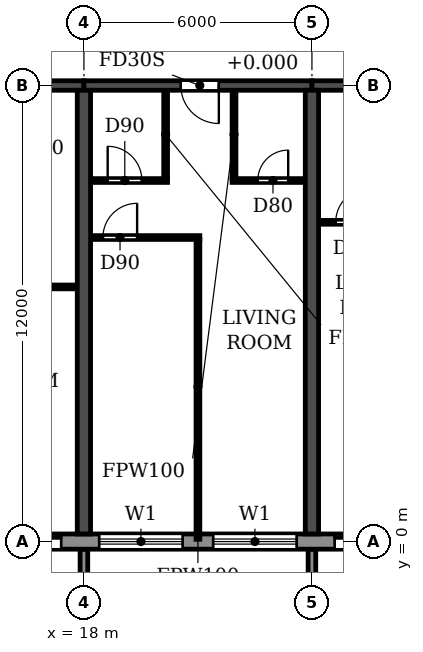
"""IFC4 building model, lengths in metres.
Left out: names, types, materials, properties, quantities, classifications, styles, units other than length and angle.
Written with IfcOpenShell. Run it as: python <this file> out.ifc"""

import sys

from ifc_helpers import new_model, si_unit, direction, frame, frame_2d, origin, place, context, subcontext, project, spatial, polyline, rectangle, outline, extrude, source, transform, mapped, element, fill, save


model = new_model("IFC4")
c1 = context("Model", 3, precision=1e-05, world=origin(), true_north=direction((0.0, 1.0)))
c2 = subcontext(c1, "Body", "Model", "MODEL_VIEW")
j1 = project(units=[si_unit("LENGTHUNIT", "METRE"), si_unit("PLANEANGLEUNIT", "RADIAN")], contexts=[c1])
p1 = place(None, origin())
s1 = spatial("IfcSite", under=j1, at=p1, CompositionType="ELEMENT")
p2 = place(p1, origin())
s2 = spatial("IfcBuilding", under=s1, at=p2, CompositionType="ELEMENT")
p3 = place(p2, frame((0.0, 0.0, 82.8)))
s3 = spatial("IfcBuildingStorey", under=s2, at=p3, CompositionType="ELEMENT", Elevation=82.8)
for number, where, z_axis, x_axis in (
    (1, (18.0, 0.2, 0.0), (0.0, 0.0, 1.0), (0.0, 1.0, 0.0)),
    (2, (24.0, 0.2, 0.0), (0.0, 0.0, 1.0), (0.0, 1.0, 0.0)),
):
    element("IfcWall", number, at=place(p3, frame(where, z_axis=z_axis, x_axis=x_axis)), inside=s3, PredefinedType="SHEAR", context=c2, shape_type="SweptSolid", body=[
        extrude(rectangle(XDim=11.675, YDim=0.35, at=frame_2d((5.837, 0.0))), origin(), (0.0, 0.0, 1.0), 3.06),
    ])
p4 = place(p3, frame((12.0, 12.0, 0.0), z_axis=(0.0, 0.0, 1.0), x_axis=(1.0, 0.0, 0.0)))
e3 = element("IfcWall", 3, at=p4, inside=s3, PredefinedType="SHEAR", context=c2, shape_type="SweptSolid", body=[
    extrude(rectangle(XDim=6.0, YDim=0.25, at=frame_2d((3.0, 0.0))), origin(), (0.0, 0.0, 1.0), 2.46),
])
p5 = place(p4, frame((2.55, 0.0, 0.0)))
e4 = element("IfcOpeningElement", 4, at=p5, cuts=e3, PredefinedType="OPENING", context=c2, shape_type="SweptSolid", body=[
    extrude(rectangle(XDim=1.0, YDim=2.1, at=frame_2d((0.5, 1.05))), frame((0.0, 0.135, 0.0), z_axis=(0.0, -1.0, 0.0), x_axis=(1.0, 0.0, 0.0)), (0.0, 0.0, 1.0), 0.27),
])
p6 = place(p3, frame((18.0, 12.0, 0.0), z_axis=(0.0, 0.0, 1.0), x_axis=(1.0, 0.0, 0.0)))
e5 = element("IfcWall", 5, at=p6, inside=s3, PredefinedType="SHEAR", context=c2, shape_type="SweptSolid", body=[
    extrude(rectangle(XDim=6.0, YDim=0.25, at=frame_2d((3.0, 0.0))), origin(), (0.0, 0.0, 1.0), 2.46),
])
p7 = place(p6, frame((2.55, 0.0, 0.0)))
e6 = element("IfcOpeningElement", 6, at=p7, cuts=e5, PredefinedType="OPENING", context=c2, shape_type="SweptSolid", body=[
    extrude(rectangle(XDim=1.0, YDim=2.1, at=frame_2d((0.5, 1.05))), frame((0.0, 0.135, 0.0), z_axis=(0.0, -1.0, 0.0), x_axis=(1.0, 0.0, 0.0)), (0.0, 0.0, 1.0), 0.27),
])
p8 = place(p3, frame((24.0, 12.0, 0.0), z_axis=(0.0, 0.0, 1.0), x_axis=(1.0, 0.0, 0.0)))
e7 = element("IfcWall", 7, at=p8, inside=s3, PredefinedType="SHEAR", context=c2, shape_type="SweptSolid", body=[
    extrude(rectangle(XDim=6.0, YDim=0.25, at=frame_2d((3.0, 0.0))), origin(), (0.0, 0.0, 1.0), 2.46),
])
p9 = place(p8, frame((2.55, 0.0, 0.0)))
e8 = element("IfcOpeningElement", 8, at=p9, cuts=e7, PredefinedType="OPENING", context=c2, shape_type="SweptSolid", body=[
    extrude(rectangle(XDim=1.0, YDim=2.1, at=frame_2d((0.5, 1.05))), frame((0.0, 0.135, 0.0), z_axis=(0.0, -1.0, 0.0), x_axis=(1.0, 0.0, 0.0)), (0.0, 0.0, 1.0), 0.27),
])
p10 = place(p3, frame((10.683, 0.0, 0.0), z_axis=(0.0, 0.0, 1.0), x_axis=(1.0, 0.0, 0.0)))
e9 = element("IfcWall", 9, at=p10, inside=s3, PredefinedType="STANDARD", context=c2, shape_type="SweptSolid", body=[
    extrude(rectangle(XDim=80.634, YDim=0.4, at=frame_2d((40.317, 0.0))), origin(), (0.0, 0.0, 1.0), 3.06),
])
p11 = place(p10, frame((1.717, 0.0, 0.9)))
e10 = element("IfcOpeningElement", 10, at=p11, cuts=e9, PredefinedType="OPENING", context=c2, shape_type="SweptSolid", body=[
    extrude(rectangle(XDim=2.2, YDim=1.5, at=frame_2d((1.1, 0.75))), frame((0.0, 0.21, 0.0), z_axis=(0.0, -1.0, 0.0), x_axis=(1.0, 0.0, 0.0)), (0.0, 0.0, 1.0), 0.42),
])
p12 = place(p10, frame((4.917, 0.0, 0.0)))
e11 = element("IfcOpeningElement", 11, at=p12, cuts=e9, PredefinedType="OPENING", context=c2, shape_type="SweptSolid", body=[
    extrude(rectangle(XDim=1.8, YDim=2.4, at=frame_2d((0.9, 1.2))), frame((0.0, 0.21, 0.0), z_axis=(0.0, -1.0, 0.0), x_axis=(1.0, 0.0, 0.0)), (0.0, 0.0, 1.0), 0.42),
])
p13 = place(p10, frame((7.717, 0.0, 0.9)))
e12 = element("IfcOpeningElement", 12, at=p13, cuts=e9, PredefinedType="OPENING", context=c2, shape_type="SweptSolid", body=[
    extrude(rectangle(XDim=2.2, YDim=1.5, at=frame_2d((1.1, 0.75))), frame((0.0, 0.21, 0.0), z_axis=(0.0, -1.0, 0.0), x_axis=(1.0, 0.0, 0.0)), (0.0, 0.0, 1.0), 0.42),
])
p14 = place(p10, frame((10.717, 0.0, 0.9)))
e13 = element("IfcOpeningElement", 13, at=p14, cuts=e9, PredefinedType="OPENING", context=c2, shape_type="SweptSolid", body=[
    extrude(rectangle(XDim=2.2, YDim=1.5, at=frame_2d((1.1, 0.75))), frame((0.0, 0.21, 0.0), z_axis=(0.0, -1.0, 0.0), x_axis=(1.0, 0.0, 0.0)), (0.0, 0.0, 1.0), 0.42),
])
p15 = place(p10, frame((13.917, 0.0, 0.0)))
e14 = element("IfcOpeningElement", 14, at=p15, cuts=e9, PredefinedType="OPENING", context=c2, shape_type="SweptSolid", body=[
    extrude(rectangle(XDim=1.8, YDim=2.4, at=frame_2d((0.9, 1.2))), frame((0.0, 0.21, 0.0), z_axis=(0.0, -1.0, 0.0), x_axis=(1.0, 0.0, 0.0)), (0.0, 0.0, 1.0), 0.42),
])
p16 = place(p10, frame((16.717, 0.0, 0.9)))
e15 = element("IfcOpeningElement", 15, at=p16, cuts=e9, PredefinedType="OPENING", context=c2, shape_type="SweptSolid", body=[
    extrude(rectangle(XDim=2.2, YDim=1.5, at=frame_2d((1.1, 0.75))), frame((0.0, 0.21, 0.0), z_axis=(0.0, -1.0, 0.0), x_axis=(1.0, 0.0, 0.0)), (0.0, 0.0, 1.0), 0.42),
])
p17 = place(p10, frame((19.717, 0.0, 0.9)))
e16 = element("IfcOpeningElement", 16, at=p17, cuts=e9, PredefinedType="OPENING", context=c2, shape_type="SweptSolid", body=[
    extrude(rectangle(XDim=2.2, YDim=1.5, at=frame_2d((1.1, 0.75))), frame((0.0, 0.21, 0.0), z_axis=(0.0, -1.0, 0.0), x_axis=(1.0, 0.0, 0.0)), (0.0, 0.0, 1.0), 0.42),
])
p18 = place(p10, frame((22.717, 0.0, 0.9)))
e17 = element("IfcOpeningElement", 17, at=p18, cuts=e9, PredefinedType="OPENING", context=c2, shape_type="SweptSolid", body=[
    extrude(rectangle(XDim=2.2, YDim=1.5, at=frame_2d((1.1, 0.75))), frame((0.0, 0.21, 0.0), z_axis=(0.0, -1.0, 0.0), x_axis=(1.0, 0.0, 0.0)), (0.0, 0.0, 1.0), 0.42),
])
p19 = place(p10, frame((25.917, 0.0, 0.0)))
e18 = element("IfcOpeningElement", 18, at=p19, cuts=e9, PredefinedType="OPENING", context=c2, shape_type="SweptSolid", body=[
    extrude(rectangle(XDim=1.8, YDim=2.4, at=frame_2d((0.9, 1.2))), frame((0.0, 0.21, 0.0), z_axis=(0.0, -1.0, 0.0), x_axis=(1.0, 0.0, 0.0)), (0.0, 0.0, 1.0), 0.42),
])
p20 = place(p10, frame((28.717, 0.0, 0.9)))
e19 = element("IfcOpeningElement", 19, at=p20, cuts=e9, PredefinedType="OPENING", context=c2, shape_type="SweptSolid", body=[
    extrude(rectangle(XDim=2.2, YDim=1.5, at=frame_2d((1.1, 0.75))), frame((0.0, 0.21, 0.0), z_axis=(0.0, -1.0, 0.0), x_axis=(1.0, 0.0, 0.0)), (0.0, 0.0, 1.0), 0.42),
])
p21 = place(p10, frame((31.717, 0.0, 0.9)))
e20 = element("IfcOpeningElement", 20, at=p21, cuts=e9, PredefinedType="OPENING", context=c2, shape_type="SweptSolid", body=[
    extrude(rectangle(XDim=2.2, YDim=1.5, at=frame_2d((1.1, 0.75))), frame((0.0, 0.21, 0.0), z_axis=(0.0, -1.0, 0.0), x_axis=(1.0, 0.0, 0.0)), (0.0, 0.0, 1.0), 0.42),
])
p22 = place(p10, frame((34.717, 0.0, 0.9)))
e21 = element("IfcOpeningElement", 21, at=p22, cuts=e9, PredefinedType="OPENING", context=c2, shape_type="SweptSolid", body=[
    extrude(rectangle(XDim=2.2, YDim=1.5, at=frame_2d((1.1, 0.75))), frame((0.0, 0.21, 0.0), z_axis=(0.0, -1.0, 0.0), x_axis=(1.0, 0.0, 0.0)), (0.0, 0.0, 1.0), 0.42),
])
p23 = place(p10, frame((37.717, 0.0, 0.9)))
e22 = element("IfcOpeningElement", 22, at=p23, cuts=e9, PredefinedType="OPENING", context=c2, shape_type="SweptSolid", body=[
    extrude(rectangle(XDim=2.2, YDim=1.5, at=frame_2d((1.1, 0.75))), frame((0.0, 0.21, 0.0), z_axis=(0.0, -1.0, 0.0), x_axis=(1.0, 0.0, 0.0)), (0.0, 0.0, 1.0), 0.42),
])
p24 = place(p10, frame((40.917, 0.0, 0.0)))
e23 = element("IfcOpeningElement", 23, at=p24, cuts=e9, PredefinedType="OPENING", context=c2, shape_type="SweptSolid", body=[
    extrude(rectangle(XDim=1.8, YDim=2.4, at=frame_2d((0.9, 1.2))), frame((0.0, 0.21, 0.0), z_axis=(0.0, -1.0, 0.0), x_axis=(1.0, 0.0, 0.0)), (0.0, 0.0, 1.0), 0.42),
])
p25 = place(p10, frame((43.717, 0.0, 0.9)))
e24 = element("IfcOpeningElement", 24, at=p25, cuts=e9, PredefinedType="OPENING", context=c2, shape_type="SweptSolid", body=[
    extrude(rectangle(XDim=2.2, YDim=1.5, at=frame_2d((1.1, 0.75))), frame((0.0, 0.21, 0.0), z_axis=(0.0, -1.0, 0.0), x_axis=(1.0, 0.0, 0.0)), (0.0, 0.0, 1.0), 0.42),
])
p26 = place(p10, frame((46.717, 0.0, 0.9)))
e25 = element("IfcOpeningElement", 25, at=p26, cuts=e9, PredefinedType="OPENING", context=c2, shape_type="SweptSolid", body=[
    extrude(rectangle(XDim=2.2, YDim=1.5, at=frame_2d((1.1, 0.75))), frame((0.0, 0.21, 0.0), z_axis=(0.0, -1.0, 0.0), x_axis=(1.0, 0.0, 0.0)), (0.0, 0.0, 1.0), 0.42),
])
p27 = place(p10, frame((49.717, 0.0, 0.9)))
e26 = element("IfcOpeningElement", 26, at=p27, cuts=e9, PredefinedType="OPENING", context=c2, shape_type="SweptSolid", body=[
    extrude(rectangle(XDim=2.2, YDim=1.5, at=frame_2d((1.1, 0.75))), frame((0.0, 0.21, 0.0), z_axis=(0.0, -1.0, 0.0), x_axis=(1.0, 0.0, 0.0)), (0.0, 0.0, 1.0), 0.42),
])
p28 = place(p10, frame((52.917, 0.0, 0.0)))
e27 = element("IfcOpeningElement", 27, at=p28, cuts=e9, PredefinedType="OPENING", context=c2, shape_type="SweptSolid", body=[
    extrude(rectangle(XDim=1.8, YDim=2.4, at=frame_2d((0.9, 1.2))), frame((0.0, 0.21, 0.0), z_axis=(0.0, -1.0, 0.0), x_axis=(1.0, 0.0, 0.0)), (0.0, 0.0, 1.0), 0.42),
])
p29 = place(p10, frame((55.717, 0.0, 0.9)))
e28 = element("IfcOpeningElement", 28, at=p29, cuts=e9, PredefinedType="OPENING", context=c2, shape_type="SweptSolid", body=[
    extrude(rectangle(XDim=2.2, YDim=1.5, at=frame_2d((1.1, 0.75))), frame((0.0, 0.21, 0.0), z_axis=(0.0, -1.0, 0.0), x_axis=(1.0, 0.0, 0.0)), (0.0, 0.0, 1.0), 0.42),
])
p30 = place(p10, frame((58.717, 0.0, 0.9)))
e29 = element("IfcOpeningElement", 29, at=p30, cuts=e9, PredefinedType="OPENING", context=c2, shape_type="SweptSolid", body=[
    extrude(rectangle(XDim=2.2, YDim=1.5, at=frame_2d((1.1, 0.75))), frame((0.0, 0.21, 0.0), z_axis=(0.0, -1.0, 0.0), x_axis=(1.0, 0.0, 0.0)), (0.0, 0.0, 1.0), 0.42),
])
p31 = place(p10, frame((61.717, 0.0, 0.9)))
e30 = element("IfcOpeningElement", 30, at=p31, cuts=e9, PredefinedType="OPENING", context=c2, shape_type="SweptSolid", body=[
    extrude(rectangle(XDim=2.2, YDim=1.5, at=frame_2d((1.1, 0.75))), frame((0.0, 0.21, 0.0), z_axis=(0.0, -1.0, 0.0), x_axis=(1.0, 0.0, 0.0)), (0.0, 0.0, 1.0), 0.42),
])
p32 = place(p10, frame((64.917, 0.0, 0.0)))
e31 = element("IfcOpeningElement", 31, at=p32, cuts=e9, PredefinedType="OPENING", context=c2, shape_type="SweptSolid", body=[
    extrude(rectangle(XDim=1.8, YDim=2.4, at=frame_2d((0.9, 1.2))), frame((0.0, 0.21, 0.0), z_axis=(0.0, -1.0, 0.0), x_axis=(1.0, 0.0, 0.0)), (0.0, 0.0, 1.0), 0.42),
])
p33 = place(p10, frame((67.717, 0.0, 0.9)))
e32 = element("IfcOpeningElement", 32, at=p33, cuts=e9, PredefinedType="OPENING", context=c2, shape_type="SweptSolid", body=[
    extrude(rectangle(XDim=2.2, YDim=1.5, at=frame_2d((1.1, 0.75))), frame((0.0, 0.21, 0.0), z_axis=(0.0, -1.0, 0.0), x_axis=(1.0, 0.0, 0.0)), (0.0, 0.0, 1.0), 0.42),
])
p34 = place(p10, frame((70.717, 0.0, 0.9)))
e33 = element("IfcOpeningElement", 33, at=p34, cuts=e9, PredefinedType="OPENING", context=c2, shape_type="SweptSolid", body=[
    extrude(rectangle(XDim=2.2, YDim=1.5, at=frame_2d((1.1, 0.75))), frame((0.0, 0.21, 0.0), z_axis=(0.0, -1.0, 0.0), x_axis=(1.0, 0.0, 0.0)), (0.0, 0.0, 1.0), 0.42),
])
p35 = place(p10, frame((73.917, 0.0, 0.0)))
e34 = element("IfcOpeningElement", 34, at=p35, cuts=e9, PredefinedType="OPENING", context=c2, shape_type="SweptSolid", body=[
    extrude(rectangle(XDim=1.8, YDim=2.4, at=frame_2d((0.9, 1.2))), frame((0.0, 0.21, 0.0), z_axis=(0.0, -1.0, 0.0), x_axis=(1.0, 0.0, 0.0)), (0.0, 0.0, 1.0), 0.42),
])
p36 = place(p10, frame((76.717, 0.0, 0.9)))
e35 = element("IfcOpeningElement", 35, at=p36, cuts=e9, PredefinedType="OPENING", context=c2, shape_type="SweptSolid", body=[
    extrude(rectangle(XDim=2.2, YDim=1.5, at=frame_2d((1.1, 0.75))), frame((0.0, 0.21, 0.0), z_axis=(0.0, -1.0, 0.0), x_axis=(1.0, 0.0, 0.0)), (0.0, 0.0, 1.0), 0.42),
])
m1 = source(origin(), c2, "Body", "SweptSolid", [
    extrude(outline(polyline([(0.0, 0.0), (0.2, 0.0), (0.2, 1.65), (0.0, 1.65), (0.0, 0.0)])), origin(), (0.0, 0.0, 1.0), 3.1),
])
for number, where in (
    (36, (17.9, -1.85, 0.0)),
    (37, (23.9, -1.85, 0.0)),
):
    element("IfcWall", number, at=place(p3, frame(where)), inside=s3, PredefinedType="STANDARD", context=c2, shape_type="MappedRepresentation", body=[
        mapped(m1, transform((0.0, 0.0, 0.0))),
    ])
p37 = place(p3, frame((15.9, 6.7, 0.0), z_axis=(0.0, 0.0, 1.0), x_axis=(1.0, 0.0, 0.0)))
e38 = element("IfcWall", 38, at=p37, inside=s3, PredefinedType="PARTITIONING", context=c2, shape_type="SweptSolid", body=[
    extrude(rectangle(XDim=1.915, YDim=0.1, at=frame_2d((0.958, 0.0))), origin(), (0.0, 0.0, 1.0), 3.06),
])
p38 = place(p3, frame((18.185, 8.0, 0.0), z_axis=(0.0, 0.0, 1.0), x_axis=(1.0, 0.0, 0.0)))
e39 = element("IfcWall", 39, at=p38, inside=s3, PredefinedType="PARTITIONING", context=c2, shape_type="SweptSolid", body=[
    extrude(rectangle(XDim=2.865, YDim=0.1, at=frame_2d((1.433, 0.0))), origin(), (0.0, 0.0, 1.0), 3.06),
])
p39 = place(p38, frame((0.315, 0.0, 0.0)))
e40 = element("IfcOpeningElement", 40, at=p39, cuts=e39, PredefinedType="OPENING", context=c2, shape_type="SweptSolid", body=[
    extrude(rectangle(XDim=0.9, YDim=2.1, at=frame_2d((0.45, 1.05))), frame((0.0, 0.06, 0.0), z_axis=(0.0, -1.0, 0.0), x_axis=(1.0, 0.0, 0.0)), (0.0, 0.0, 1.0), 0.12),
])
p40 = place(p3, frame((24.185, 8.4, 0.0), z_axis=(0.0, 0.0, 1.0), x_axis=(1.0, 0.0, 0.0)))
e41 = element("IfcWall", 41, at=p40, inside=s3, PredefinedType="PARTITIONING", context=c2, shape_type="SweptSolid", body=[
    extrude(rectangle(XDim=2.015, YDim=0.1, at=frame_2d((1.007, 0.0))), origin(), (0.0, 0.0, 1.0), 3.06),
])
p41 = place(p40, frame((0.44, 0.0, 0.0)))
e42 = element("IfcOpeningElement", 42, at=p41, cuts=e41, PredefinedType="OPENING", context=c2, shape_type="SweptSolid", body=[
    extrude(rectangle(XDim=0.9, YDim=2.1, at=frame_2d((0.45, 1.05))), frame((0.0, 0.06, 0.0), z_axis=(0.0, -1.0, 0.0), x_axis=(1.0, 0.0, 0.0)), (0.0, 0.0, 1.0), 0.12),
])
p42 = place(p3, frame((18.185, 9.5, 0.0), z_axis=(0.0, 0.0, 1.0), x_axis=(1.0, 0.0, 0.0)))
e43 = element("IfcWall", 43, at=p42, inside=s3, PredefinedType="PARTITIONING", context=c2, shape_type="SweptSolid", body=[
    extrude(rectangle(XDim=2.015, YDim=0.1, at=frame_2d((1.007, 0.0))), origin(), (0.0, 0.0, 1.0), 3.06),
])
p43 = place(p42, frame((0.44, 0.0, 0.0)))
e44 = element("IfcOpeningElement", 44, at=p43, cuts=e43, PredefinedType="OPENING", context=c2, shape_type="SweptSolid", body=[
    extrude(rectangle(XDim=0.9, YDim=2.1, at=frame_2d((0.45, 1.05))), frame((0.0, 0.06, 0.0), z_axis=(0.0, -1.0, 0.0), x_axis=(1.0, 0.0, 0.0)), (0.0, 0.0, 1.0), 0.12),
])
p44 = place(p3, frame((21.9, 9.5, 0.0), z_axis=(0.0, 0.0, 1.0), x_axis=(1.0, 0.0, 0.0)))
e45 = element("IfcWall", 45, at=p44, inside=s3, PredefinedType="PARTITIONING", context=c2, shape_type="SweptSolid", body=[
    extrude(rectangle(XDim=1.915, YDim=0.1, at=frame_2d((0.958, 0.0))), origin(), (0.0, 0.0, 1.0), 3.06),
])
p45 = place(p44, frame((0.675, 0.0, 0.0)))
e46 = element("IfcOpeningElement", 46, at=p45, cuts=e45, PredefinedType="OPENING", context=c2, shape_type="SweptSolid", body=[
    extrude(rectangle(XDim=0.8, YDim=2.1, at=frame_2d((0.4, 1.05))), frame((0.0, 0.06, 0.0), z_axis=(0.0, -1.0, 0.0), x_axis=(1.0, 0.0, 0.0)), (0.0, 0.0, 1.0), 0.12),
])
p46 = place(p3, frame((20.15, 9.55, 0.0), z_axis=(0.0, 0.0, 1.0), x_axis=(0.0, 1.0, 0.0)))
e47 = element("IfcWall", 47, at=p46, inside=s3, PredefinedType="PARTITIONING", context=c2, shape_type="SweptSolid", body=[
    extrude(rectangle(XDim=2.315, YDim=0.1, at=frame_2d((1.157, 0.0))), origin(), (0.0, 0.0, 1.0), 3.06),
])
p47 = place(p3, frame((21.0, 0.06, 0.0), z_axis=(0.0, 0.0, 1.0), x_axis=(0.0, 1.0, 0.0)))
e48 = element("IfcWall", 48, at=p47, inside=s3, PredefinedType="PARTITIONING", context=c2, shape_type="SweptSolid", body=[
    extrude(rectangle(XDim=7.89, YDim=0.1, at=frame_2d((3.945, 0.0))), origin(), (0.0, 0.0, 1.0), 3.06),
])
p48 = place(p3, frame((21.95, 9.55, 0.0), z_axis=(0.0, 0.0, 1.0), x_axis=(0.0, 1.0, 0.0)))
e49 = element("IfcWall", 49, at=p48, inside=s3, PredefinedType="PARTITIONING", context=c2, shape_type="SweptSolid", body=[
    extrude(rectangle(XDim=2.315, YDim=0.1, at=frame_2d((1.157, 0.0))), origin(), (0.0, 0.0, 1.0), 3.06),
])
p49 = place(p12, origin())
e50 = element("IfcDoor", 50, at=p49, inside=s3, OperationType="DOUBLE_DOOR_SLIDING", PredefinedType="DOOR", context=c2, shape_type="SweptSolid", body=[
    extrude(rectangle(XDim=1.8, YDim=2.4, at=frame_2d((0.9, 1.2))), frame((0.0, 0.025, 0.0), z_axis=(0.0, -1.0, 0.0), x_axis=(1.0, 0.0, 0.0)), (0.0, 0.0, 1.0), 0.05),
])
fill(e11, e50)
p50 = place(p13, origin())
e51 = element("IfcWindow", 51, at=p50, inside=s3, PartitioningType="DOUBLE_PANEL_HORIZONTAL", PredefinedType="WINDOW", context=c2, shape_type="SweptSolid", body=[
    extrude(rectangle(XDim=2.2, YDim=1.5, at=frame_2d((1.1, 0.75))), frame((0.0, 0.03, 0.0), z_axis=(0.0, -1.0, 0.0), x_axis=(1.0, 0.0, 0.0)), (0.0, 0.0, 1.0), 0.06),
])
fill(e12, e51)
p51 = place(p14, origin())
e52 = element("IfcWindow", 52, at=p51, inside=s3, PartitioningType="DOUBLE_PANEL_HORIZONTAL", PredefinedType="WINDOW", context=c2, shape_type="SweptSolid", body=[
    extrude(rectangle(XDim=2.2, YDim=1.5, at=frame_2d((1.1, 0.75))), frame((0.0, 0.03, 0.0), z_axis=(0.0, -1.0, 0.0), x_axis=(1.0, 0.0, 0.0)), (0.0, 0.0, 1.0), 0.06),
])
fill(e13, e52)
p52 = place(p15, origin())
e53 = element("IfcDoor", 53, at=p52, inside=s3, OperationType="DOUBLE_DOOR_SLIDING", PredefinedType="DOOR", context=c2, shape_type="SweptSolid", body=[
    extrude(rectangle(XDim=1.8, YDim=2.4, at=frame_2d((0.9, 1.2))), frame((0.0, 0.025, 0.0), z_axis=(0.0, -1.0, 0.0), x_axis=(1.0, 0.0, 0.0)), (0.0, 0.0, 1.0), 0.05),
])
fill(e14, e53)
p53 = place(p39, origin())
e54 = element("IfcDoor", 54, at=p53, inside=s3, OperationType="SINGLE_SWING_RIGHT", PredefinedType="DOOR", context=c2, shape_type="SweptSolid", body=[
    extrude(rectangle(XDim=0.9, YDim=2.1, at=frame_2d((0.45, 1.05))), frame((0.0, 0.025, 0.0), z_axis=(0.0, -1.0, 0.0), x_axis=(1.0, 0.0, 0.0)), (0.0, 0.0, 1.0), 0.05),
])
fill(e40, e54)
p54 = place(p43, origin())
e55 = element("IfcDoor", 55, at=p54, inside=s3, OperationType="SINGLE_SWING_LEFT", PredefinedType="DOOR", context=c2, shape_type="SweptSolid", body=[
    extrude(rectangle(XDim=0.9, YDim=2.1, at=frame_2d((0.45, 1.05))), frame((0.0, 0.025, 0.0), z_axis=(0.0, -1.0, 0.0), x_axis=(1.0, 0.0, 0.0)), (0.0, 0.0, 1.0), 0.05),
])
fill(e44, e55)
p55 = place(p7, frame((1.0, 0.0, 0.0), z_axis=(0.0, 0.0, 1.0), x_axis=(-1.0, 0.0, 0.0)))
e56 = element("IfcDoor", 56, at=p55, inside=s3, OperationType="SINGLE_SWING_LEFT", PredefinedType="DOOR", context=c2, shape_type="SweptSolid", body=[
    extrude(rectangle(XDim=1.0, YDim=2.1, at=frame_2d((0.5, 1.05))), frame((0.0, 0.025, 0.0), z_axis=(0.0, -1.0, 0.0), x_axis=(1.0, 0.0, 0.0)), (0.0, 0.0, 1.0), 0.05),
])
fill(e6, e56)
p56 = place(p45, origin())
e57 = element("IfcDoor", 57, at=p56, inside=s3, OperationType="SINGLE_SWING_RIGHT", PredefinedType="DOOR", context=c2, shape_type="SweptSolid", body=[
    extrude(rectangle(XDim=0.8, YDim=2.1, at=frame_2d((0.4, 1.05))), frame((0.0, 0.025, 0.0), z_axis=(0.0, -1.0, 0.0), x_axis=(1.0, 0.0, 0.0)), (0.0, 0.0, 1.0), 0.05),
])
fill(e46, e57)
p57 = place(p41, origin())
e58 = element("IfcDoor", 58, at=p57, inside=s3, OperationType="SINGLE_SWING_RIGHT", PredefinedType="DOOR", context=c2, shape_type="SweptSolid", body=[
    extrude(rectangle(XDim=0.9, YDim=2.1, at=frame_2d((0.45, 1.05))), frame((0.0, 0.025, 0.0), z_axis=(0.0, -1.0, 0.0), x_axis=(1.0, 0.0, 0.0)), (0.0, 0.0, 1.0), 0.05),
])
fill(e42, e58)
save(model, sys.argv[1])
